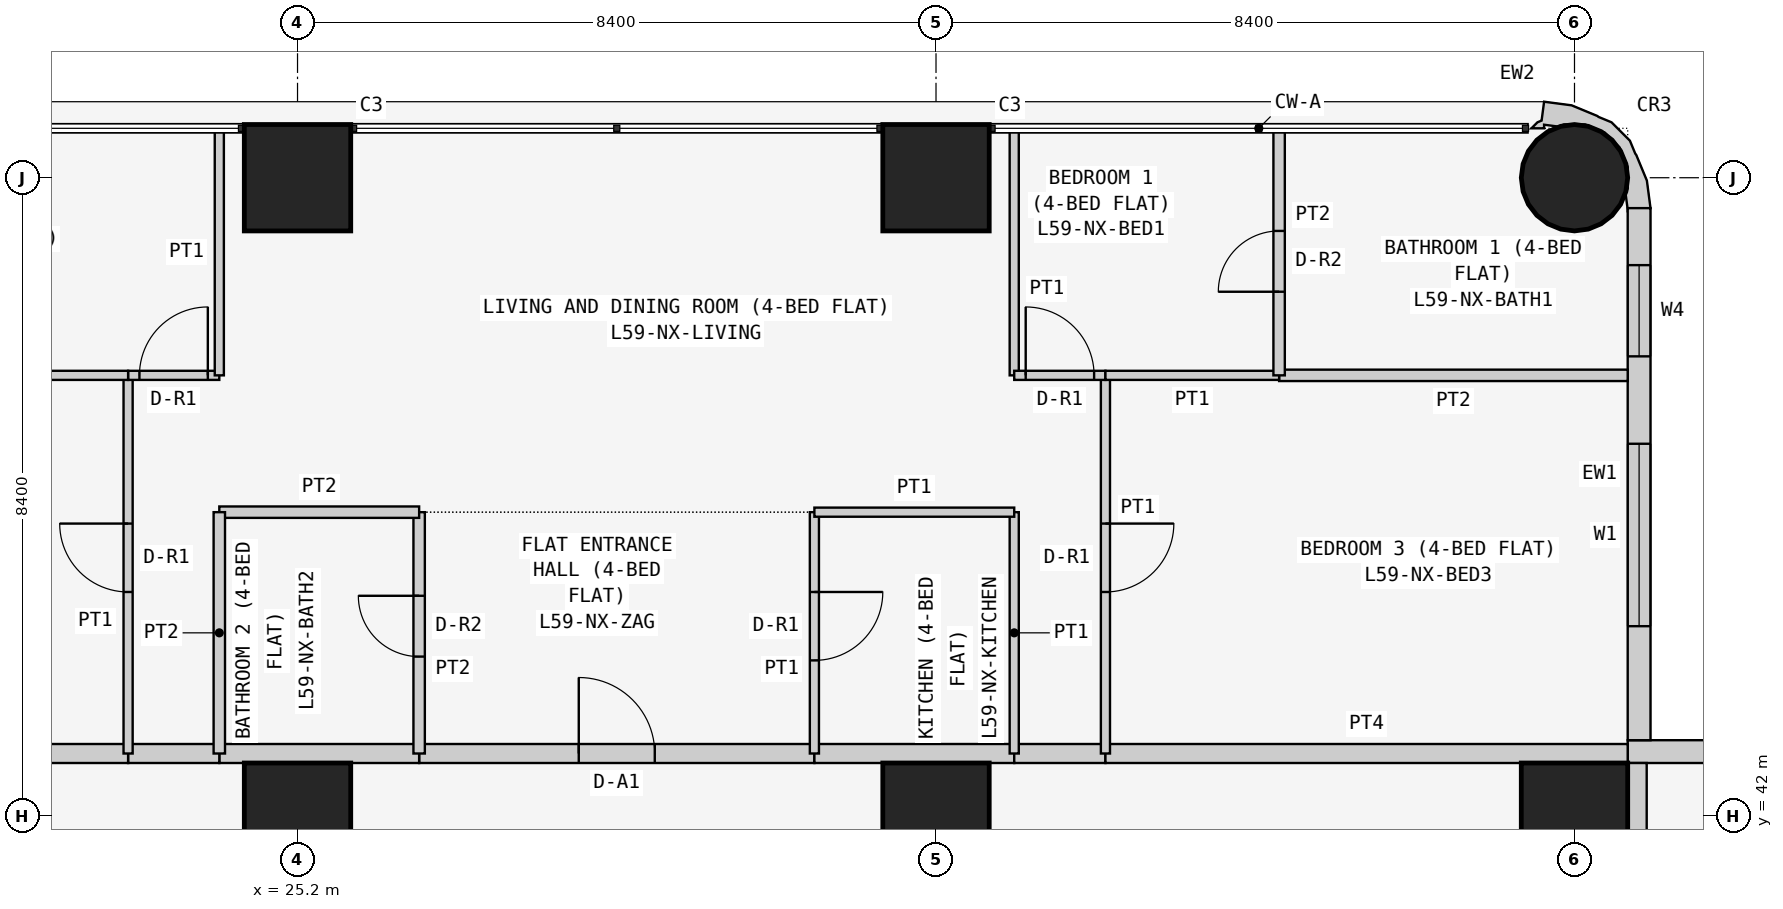
"""IFC4 building model, lengths in metres.
Left out: names, types, materials, properties, quantities, classifications, styles, units other than length and angle.
Written with IfcOpenShell. Run it as: python <this file> out.ifc"""

import sys

from ifc_helpers import new_model, si_unit, direction, frame, frame_2d, origin, origin_2d, place, context, subcontext, project, spatial, polyline, rectangle, circle, outline, extrude, element, fill, save


model = new_model("IFC4")
c1 = context("Model", 3, precision=1e-05, world=origin(), true_north=direction((0.0, 1.0)))
c2 = subcontext(c1, "Body", "Model", "MODEL_VIEW")
j1 = project(units=[si_unit("LENGTHUNIT", "METRE"), si_unit("PLANEANGLEUNIT", "RADIAN")], contexts=[c1])
p1 = place(None, origin())
s1 = spatial("IfcSite", under=j1, at=p1, CompositionType="ELEMENT")
p2 = place(p1, origin())
s2 = spatial("IfcBuilding", under=s1, at=p2, CompositionType="ELEMENT")
p3 = place(p2, frame((0.0, 0.0, 226.5)))
s3 = spatial("IfcBuildingStorey", under=s2, at=p3, CompositionType="ELEMENT", Elevation=226.5)
for number, where, z_axis, x_axis in (
    (1, (25.2, 42.0, 0.0), (0.0, 0.0, 1.0), (1.0, 0.0, 0.0)),
    (2, (25.2, 50.4, 0.0), (0.0, 0.0, 1.0), (1.0, 0.0, 0.0)),
    (3, (33.6, 42.0, 0.0), (0.0, 0.0, 1.0), (1.0, 0.0, 0.0)),
    (4, (33.6, 50.4, 0.0), (0.0, 0.0, 1.0), (1.0, 0.0, 0.0)),
    (5, (42.0, 42.0, 0.0), (0.0, 0.0, 1.0), (1.0, 0.0, 0.0)),
):
    element("IfcColumn", number, at=place(p3, frame(where, z_axis=z_axis, x_axis=x_axis)), inside=s3, PredefinedType="COLUMN", context=c2, shape_type="SweptSolid", body=[
        extrude(rectangle(XDim=1.4, YDim=1.4, at=origin_2d()), origin(), (0.0, 0.0, 1.0), 3.6),
    ])
p4 = place(p3, frame((42.0, 50.4, 0.0), z_axis=(0.0, 0.0, 1.0), x_axis=(1.0, 0.0, 0.0)))
e6 = element("IfcColumn", 6, at=p4, inside=s3, PredefinedType="COLUMN", context=c2, shape_type="SweptSolid", body=[
    extrude(circle(Radius=0.7, at=origin_2d()), origin(), (0.0, 0.0, 1.0), 3.6),
])
p5 = place(p3, frame((50.0, 42.85, 0.0), z_axis=(0.0, 0.0, 1.0), x_axis=(-1.0, 0.0, 0.0)))
e7 = element("IfcWall", 7, at=p5, inside=s3, PredefinedType="SOLIDWALL", context=c2, shape_type="SweptSolid", body=[
    extrude(rectangle(XDim=7.3, YDim=0.3, at=frame_2d((3.65, 0.0))), origin(), (0.0, 0.0, 1.0), 3.45),
])
p6 = place(p5, frame((3.1, 0.0, 0.9)))
e8 = element("IfcOpeningElement", 8, at=p6, cuts=e7, PredefinedType="OPENING", context=c2, shape_type="SweptSolid", body=[
    extrude(rectangle(XDim=2.4, YDim=1.5, at=frame_2d((1.2, 0.75))), frame((0.0, 0.16, 0.0), z_axis=(0.0, -1.0, 0.0), x_axis=(1.0, 0.0, 0.0)), (0.0, 0.0, 1.0), 0.32),
])
p7 = place(p5, frame((0.75, 0.0, 0.9)))
e9 = element("IfcOpeningElement", 9, at=p7, cuts=e7, PredefinedType="OPENING", context=c2, shape_type="SweptSolid", body=[
    extrude(rectangle(XDim=1.2, YDim=1.5, at=frame_2d((0.6, 0.75))), frame((0.0, 0.16, 0.0), z_axis=(0.0, -1.0, 0.0), x_axis=(1.0, 0.0, 0.0)), (0.0, 0.0, 1.0), 0.32),
])
p8 = place(p3, frame((42.85, 43.0, 0.0), z_axis=(0.0, 0.0, 1.0), x_axis=(0.0, 1.0, 0.0)))
e10 = element("IfcWall", 10, at=p8, inside=s3, PredefinedType="SOLIDWALL", context=c2, shape_type="SweptSolid", body=[
    extrude(rectangle(XDim=7.0, YDim=0.3, at=frame_2d((3.5, 0.0))), origin(), (0.0, 0.0, 1.0), 3.45),
])
p9 = place(p8, frame((1.5, 0.0, 0.9)))
e11 = element("IfcOpeningElement", 11, at=p9, cuts=e10, PredefinedType="OPENING", context=c2, shape_type="SweptSolid", body=[
    extrude(rectangle(XDim=2.4, YDim=1.5, at=frame_2d((1.2, 0.75))), frame((0.0, 0.16, 0.0), z_axis=(0.0, -1.0, 0.0), x_axis=(1.0, 0.0, 0.0)), (0.0, 0.0, 1.0), 0.32),
])
p10 = place(p8, frame((5.05, 0.0, 0.9)))
e12 = element("IfcOpeningElement", 12, at=p10, cuts=e10, PredefinedType="OPENING", context=c2, shape_type="SweptSolid", body=[
    extrude(rectangle(XDim=1.2, YDim=1.5, at=frame_2d((0.6, 0.75))), frame((0.0, 0.16, 0.0), z_axis=(0.0, -1.0, 0.0), x_axis=(1.0, 0.0, 0.0)), (0.0, 0.0, 1.0), 0.32),
])
p11 = place(p3, frame((42.724, 50.11, 0.0), z_axis=(0.0, 0.0, 1.0), x_axis=(0.439933741929, 0.898030234854, 0.0)))
e13 = element("IfcWall", 13, at=p11, inside=s3, PredefinedType="SOLIDWALL", context=c2, shape_type="SweptSolid", body=[
    extrude(outline(polyline([(-0.145, -0.044), (0.022, -0.296), (0.327, -0.094), (0.568, 0.18), (0.577, 0.199), (0.7, 0.337), (0.811, 0.661), (0.799, 0.845), (0.803, 0.866), (0.78, 1.231), (0.664, 1.577), (0.426, 1.497), (0.382, 1.536), (0.276, 1.572), (0.349, 1.423), (0.392, 1.444), (0.453, 1.261), (0.51, 1.211), (0.632, 0.961), (0.65, 0.683), (0.56, 0.419), (0.375, 0.21), (0.125, 0.087), (0.05, 0.082), (-0.127, -0.035), (-0.145, -0.044)])), origin(), (0.0, 0.0, 1.0), 3.45),
])
p12 = place(p3, frame((26.8, 42.825, 0.0), z_axis=(0.0, 0.0, 1.0), x_axis=(1.0, 0.0, 0.0)))
e14 = element("IfcWall", 14, at=p12, inside=s3, PredefinedType="PARTITIONING", context=c2, shape_type="SweptSolid", body=[
    extrude(rectangle(XDim=5.2, YDim=0.25, at=frame_2d((2.6, 0.0))), origin(), (0.0, 0.0, 1.0), 3.45),
])
p13 = place(p12, frame((2.1, 0.0, 0.0)))
e15 = element("IfcOpeningElement", 15, at=p13, cuts=e14, PredefinedType="OPENING", context=c2, shape_type="SweptSolid", body=[
    extrude(rectangle(XDim=1.0, YDim=2.1, at=frame_2d((0.5, 1.05))), frame((0.0, 0.135, 0.0), z_axis=(0.0, -1.0, 0.0), x_axis=(1.0, 0.0, 0.0)), (0.0, 0.0, 1.0), 0.27),
])
p14 = place(p3, frame((24.171, 42.825, 0.0), z_axis=(0.0, 0.0, 1.0), x_axis=(1.0, 0.0, 0.0)))
e16 = element("IfcWall", 16, at=p14, inside=s3, PredefinedType="PARTITIONING", context=c2, shape_type="SweptSolid", body=[
    extrude(rectangle(XDim=2.629, YDim=0.25, at=frame_2d((1.314, 0.0))), origin(), (0.0, 0.0, 1.0), 3.45),
])
p15 = place(p3, frame((32.0, 42.825, 0.0), z_axis=(0.0, 0.0, 1.0), x_axis=(1.0, 0.0, 0.0)))
e17 = element("IfcWall", 17, at=p15, inside=s3, PredefinedType="PARTITIONING", context=c2, shape_type="SweptSolid", body=[
    extrude(rectangle(XDim=2.629, YDim=0.25, at=frame_2d((1.314, 0.0))), origin(), (0.0, 0.0, 1.0), 3.45),
])
p16 = place(p3, frame((22.971, 42.825, 0.0), z_axis=(0.0, 0.0, 1.0), x_axis=(1.0, 0.0, 0.0)))
e18 = element("IfcWall", 18, at=p16, inside=s3, PredefinedType="PARTITIONING", context=c2, shape_type="SweptSolid", body=[
    extrude(rectangle(XDim=1.2, YDim=0.25, at=frame_2d((0.6, 0.0))), origin(), (0.0, 0.0, 1.0), 3.45),
])
p17 = place(p3, frame((34.629, 42.825, 0.0), z_axis=(0.0, 0.0, 1.0), x_axis=(1.0, 0.0, 0.0)))
e19 = element("IfcWall", 19, at=p17, inside=s3, PredefinedType="PARTITIONING", context=c2, shape_type="SweptSolid", body=[
    extrude(rectangle(XDim=1.2, YDim=0.25, at=frame_2d((0.6, 0.0))), origin(), (0.0, 0.0, 1.0), 3.45),
])
for number, where, z_axis, x_axis in (
    (20, (16.1, 42.825, 0.0), (0.0, 0.0, 1.0), (1.0, 0.0, 0.0)),
    (21, (35.829, 42.825, 0.0), (0.0, 0.0, 1.0), (1.0, 0.0, 0.0)),
):
    element("IfcWall", number, at=place(p3, frame(where, z_axis=z_axis, x_axis=x_axis)), inside=s3, PredefinedType="PARTITIONING", context=c2, shape_type="SweptSolid", body=[
        extrude(rectangle(XDim=6.871, YDim=0.25, at=frame_2d((3.436, 0.0))), origin(), (0.0, 0.0, 1.0), 3.45),
    ])
p18 = place(p3, frame((42.825, 42.7, 0.0), z_axis=(0.0, 0.0, 1.0), x_axis=(0.0, -1.0, 0.0)))
e22 = element("IfcWall", 22, at=p18, inside=s3, PredefinedType="PARTITIONING", context=c2, shape_type="SweptSolid", body=[
    extrude(rectangle(XDim=6.471, YDim=0.25, at=frame_2d((3.235, 0.0))), origin(), (0.0, 0.0, 1.0), 3.45),
])
p19 = place(p3, frame((26.8, 46.0, 0.0), z_axis=(0.0, 0.0, 1.0), x_axis=(0.0, -1.0, 0.0)))
e23 = element("IfcWall", 23, at=p19, inside=s3, PredefinedType="PARTITIONING", context=c2, shape_type="SweptSolid", body=[
    extrude(rectangle(XDim=3.175, YDim=0.15, at=frame_2d((1.587, 0.0))), origin(), (0.0, 0.0, 1.0), 3.45),
])
p20 = place(p19, frame((1.1, 0.0, 0.0)))
e24 = element("IfcOpeningElement", 24, at=p20, cuts=e23, PredefinedType="OPENING", context=c2, shape_type="SweptSolid", body=[
    extrude(rectangle(XDim=0.8, YDim=2.1, at=frame_2d((0.4, 1.05))), frame((0.0, 0.085, 0.0), z_axis=(0.0, -1.0, 0.0), x_axis=(1.0, 0.0, 0.0)), (0.0, 0.0, 1.0), 0.17),
])
p21 = place(p3, frame((32.0, 42.825, 0.0), z_axis=(0.0, 0.0, 1.0), x_axis=(0.0, 1.0, 0.0)))
e25 = element("IfcWall", 25, at=p21, inside=s3, PredefinedType="PARTITIONING", context=c2, shape_type="SweptSolid", body=[
    extrude(rectangle(XDim=3.175, YDim=0.12, at=frame_2d((1.587, 0.0))), origin(), (0.0, 0.0, 1.0), 3.45),
])
p22 = place(p21, frame((1.225, 0.0, 0.0)))
e26 = element("IfcOpeningElement", 26, at=p22, cuts=e25, PredefinedType="OPENING", context=c2, shape_type="SweptSolid", body=[
    extrude(rectangle(XDim=0.9, YDim=2.1, at=frame_2d((0.45, 1.05))), frame((0.0, 0.07, 0.0), z_axis=(0.0, -1.0, 0.0), x_axis=(1.0, 0.0, 0.0)), (0.0, 0.0, 1.0), 0.14),
])
p23 = place(p3, frame((26.8, 46.0, 0.0), z_axis=(0.0, 0.0, 1.0), x_axis=(-1.0, 0.0, 0.0)))
e27 = element("IfcWall", 27, at=p23, inside=s3, PredefinedType="PARTITIONING", context=c2, shape_type="SweptSolid", body=[
    extrude(rectangle(XDim=2.629, YDim=0.15, at=frame_2d((1.314, 0.0))), origin(), (0.0, 0.0, 1.0), 3.45),
])
p24 = place(p3, frame((24.171, 46.0, 0.0), z_axis=(0.0, 0.0, 1.0), x_axis=(0.0, -1.0, 0.0)))
e28 = element("IfcWall", 28, at=p24, inside=s3, PredefinedType="PARTITIONING", context=c2, shape_type="SweptSolid", body=[
    extrude(rectangle(XDim=3.175, YDim=0.15, at=frame_2d((1.587, 0.0))), origin(), (0.0, 0.0, 1.0), 3.45),
])
p25 = place(p3, frame((34.629, 42.825, 0.0), z_axis=(0.0, 0.0, 1.0), x_axis=(0.0, 1.0, 0.0)))
e29 = element("IfcWall", 29, at=p25, inside=s3, PredefinedType="PARTITIONING", context=c2, shape_type="SweptSolid", body=[
    extrude(rectangle(XDim=3.175, YDim=0.12, at=frame_2d((1.587, 0.0))), origin(), (0.0, 0.0, 1.0), 3.45),
])
p26 = place(p3, frame((34.629, 46.0, 0.0), z_axis=(0.0, 0.0, 1.0), x_axis=(-1.0, 0.0, 0.0)))
e30 = element("IfcWall", 30, at=p26, inside=s3, PredefinedType="PARTITIONING", context=c2, shape_type="SweptSolid", body=[
    extrude(rectangle(XDim=2.629, YDim=0.12, at=frame_2d((1.314, 0.0))), origin(), (0.0, 0.0, 1.0), 3.45),
])
p27 = place(p3, frame((22.971, 42.825, 0.0), z_axis=(0.0, 0.0, 1.0), x_axis=(0.0, 1.0, 0.0)))
e31 = element("IfcWall", 31, at=p27, inside=s3, PredefinedType="PARTITIONING", context=c2, shape_type="SweptSolid", body=[
    extrude(rectangle(XDim=4.975, YDim=0.12, at=frame_2d((2.488, 0.0))), origin(), (0.0, 0.0, 1.0), 3.45),
])
p28 = place(p27, frame((2.125, 0.0, 0.0)))
e32 = element("IfcOpeningElement", 32, at=p28, cuts=e31, PredefinedType="OPENING", context=c2, shape_type="SweptSolid", body=[
    extrude(rectangle(XDim=0.9, YDim=2.1, at=frame_2d((0.45, 1.05))), frame((0.0, 0.07, 0.0), z_axis=(0.0, -1.0, 0.0), x_axis=(1.0, 0.0, 0.0)), (0.0, 0.0, 1.0), 0.14),
])
p29 = place(p3, frame((22.971, 47.8, 0.0), z_axis=(0.0, 0.0, 1.0), x_axis=(1.0, 0.0, 0.0)))
e33 = element("IfcWall", 33, at=p29, inside=s3, PredefinedType="PARTITIONING", context=c2, shape_type="SweptSolid", body=[
    extrude(rectangle(XDim=1.2, YDim=0.12, at=frame_2d((0.6, 0.0))), origin(), (0.0, 0.0, 1.0), 3.45),
])
p30 = place(p29, frame((0.149, 0.0, 0.0)))
e34 = element("IfcOpeningElement", 34, at=p30, cuts=e33, PredefinedType="OPENING", context=c2, shape_type="SweptSolid", body=[
    extrude(rectangle(XDim=0.9, YDim=2.1, at=frame_2d((0.45, 1.05))), frame((0.0, 0.07, 0.0), z_axis=(0.0, -1.0, 0.0), x_axis=(1.0, 0.0, 0.0)), (0.0, 0.0, 1.0), 0.14),
])
p31 = place(p3, frame((24.171, 47.8, 0.0), z_axis=(0.0, 0.0, 1.0), x_axis=(0.0, 1.0, 0.0)))
e35 = element("IfcWall", 35, at=p31, inside=s3, PredefinedType="PARTITIONING", context=c2, shape_type="SweptSolid", body=[
    extrude(rectangle(XDim=3.25, YDim=0.12, at=frame_2d((1.625, 0.0))), origin(), (0.0, 0.0, 1.0), 3.45),
])
p32 = place(p3, frame((35.829, 47.8, 0.0), z_axis=(0.0, 0.0, 1.0), x_axis=(0.0, -1.0, 0.0)))
e36 = element("IfcWall", 36, at=p32, inside=s3, PredefinedType="PARTITIONING", context=c2, shape_type="SweptSolid", body=[
    extrude(rectangle(XDim=4.975, YDim=0.12, at=frame_2d((2.488, 0.0))), origin(), (0.0, 0.0, 1.0), 3.45),
])
p33 = place(p32, frame((1.95, 0.0, 0.0)))
e37 = element("IfcOpeningElement", 37, at=p33, cuts=e36, PredefinedType="OPENING", context=c2, shape_type="SweptSolid", body=[
    extrude(rectangle(XDim=0.9, YDim=2.1, at=frame_2d((0.45, 1.05))), frame((0.0, 0.07, 0.0), z_axis=(0.0, -1.0, 0.0), x_axis=(1.0, 0.0, 0.0)), (0.0, 0.0, 1.0), 0.14),
])
p34 = place(p3, frame((34.629, 51.05, 0.0), z_axis=(0.0, 0.0, 1.0), x_axis=(0.0, -1.0, 0.0)))
e38 = element("IfcWall", 38, at=p34, inside=s3, PredefinedType="PARTITIONING", context=c2, shape_type="SweptSolid", body=[
    extrude(rectangle(XDim=3.25, YDim=0.12, at=frame_2d((1.625, 0.0))), origin(), (0.0, 0.0, 1.0), 3.45),
])
p35 = place(p3, frame((34.629, 47.8, 0.0), z_axis=(0.0, 0.0, 1.0), x_axis=(1.0, 0.0, 0.0)))
e39 = element("IfcWall", 39, at=p35, inside=s3, PredefinedType="PARTITIONING", context=c2, shape_type="SweptSolid", body=[
    extrude(rectangle(XDim=1.2, YDim=0.12, at=frame_2d((0.6, 0.0))), origin(), (0.0, 0.0, 1.0), 3.45),
])
p36 = place(p35, frame((0.151, 0.0, 0.0)))
e40 = element("IfcOpeningElement", 40, at=p36, cuts=e39, PredefinedType="OPENING", context=c2, shape_type="SweptSolid", body=[
    extrude(rectangle(XDim=0.9, YDim=2.1, at=frame_2d((0.45, 1.05))), frame((0.0, 0.07, 0.0), z_axis=(0.0, -1.0, 0.0), x_axis=(1.0, 0.0, 0.0)), (0.0, 0.0, 1.0), 0.14),
])
p37 = place(p3, frame((22.971, 47.8, 0.0), z_axis=(0.0, 0.0, 1.0), x_axis=(-1.0, 0.0, 0.0)))
e41 = element("IfcWall", 41, at=p37, inside=s3, PredefinedType="PARTITIONING", context=c2, shape_type="SweptSolid", body=[
    extrude(rectangle(XDim=6.871, YDim=0.12, at=frame_2d((3.436, 0.0))), origin(), (0.0, 0.0, 1.0), 3.45),
])
p38 = place(p3, frame((42.7, 47.8, 0.0), z_axis=(0.0, 0.0, 1.0), x_axis=(-1.0, 0.0, 0.0)))
e42 = element("IfcWall", 42, at=p38, inside=s3, PredefinedType="PARTITIONING", context=c2, shape_type="SweptSolid", body=[
    extrude(rectangle(XDim=4.586, YDim=0.15, at=frame_2d((2.293, 0.0))), origin(), (0.0, 0.0, 1.0), 3.45),
])
p39 = place(p3, frame((38.114, 47.8, 0.0), z_axis=(0.0, 0.0, 1.0), x_axis=(-1.0, 0.0, 0.0)))
e43 = element("IfcWall", 43, at=p39, inside=s3, PredefinedType="PARTITIONING", context=c2, shape_type="SweptSolid", body=[
    extrude(rectangle(XDim=2.285, YDim=0.12, at=frame_2d((1.143, 0.0))), origin(), (0.0, 0.0, 1.0), 3.45),
])
p40 = place(p3, frame((38.114, 51.05, 0.0), z_axis=(0.0, 0.0, 1.0), x_axis=(0.0, -1.0, 0.0)))
e44 = element("IfcWall", 44, at=p40, inside=s3, PredefinedType="PARTITIONING", context=c2, shape_type="SweptSolid", body=[
    extrude(rectangle(XDim=3.25, YDim=0.15, at=frame_2d((1.625, 0.0))), origin(), (0.0, 0.0, 1.0), 3.45),
])
p41 = place(p40, frame((1.35, 0.0, 0.0)))
e45 = element("IfcOpeningElement", 45, at=p41, cuts=e44, PredefinedType="OPENING", context=c2, shape_type="SweptSolid", body=[
    extrude(rectangle(XDim=0.8, YDim=2.1, at=frame_2d((0.4, 1.05))), frame((0.0, 0.085, 0.0), z_axis=(0.0, -1.0, 0.0), x_axis=(1.0, 0.0, 0.0)), (0.0, 0.0, 1.0), 0.17),
])
p42 = place(p9, origin())
e46 = element("IfcWindow", 46, at=p42, inside=s3, PartitioningType="SINGLE_PANEL", PredefinedType="WINDOW", context=c2, shape_type="SweptSolid", body=[
    extrude(rectangle(XDim=2.4, YDim=1.5, at=frame_2d((1.2, 0.75))), frame((0.0, 0.03, 0.0), z_axis=(0.0, -1.0, 0.0), x_axis=(1.0, 0.0, 0.0)), (0.0, 0.0, 1.0), 0.06),
])
fill(e11, e46)
p43 = place(p10, origin())
e47 = element("IfcWindow", 47, at=p43, inside=s3, PartitioningType="SINGLE_PANEL", PredefinedType="WINDOW", context=c2, shape_type="SweptSolid", body=[
    extrude(rectangle(XDim=1.2, YDim=1.5, at=frame_2d((0.6, 0.75))), frame((0.0, 0.03, 0.0), z_axis=(0.0, -1.0, 0.0), x_axis=(1.0, 0.0, 0.0)), (0.0, 0.0, 1.0), 0.06),
])
fill(e12, e47)
p44 = place(p13, origin())
e48 = element("IfcDoor", 48, at=p44, inside=s3, OperationType="SINGLE_SWING_LEFT", PredefinedType="DOOR", context=c2, shape_type="SweptSolid", body=[
    extrude(rectangle(XDim=1.0, YDim=2.1, at=frame_2d((0.5, 1.05))), frame((0.0, 0.025, 0.0), z_axis=(0.0, -1.0, 0.0), x_axis=(1.0, 0.0, 0.0)), (0.0, 0.0, 1.0), 0.05),
])
fill(e15, e48)
p45 = place(p20, frame((0.8, 0.0, 0.0), z_axis=(0.0, 0.0, 1.0), x_axis=(-1.0, 0.0, 0.0)))
e49 = element("IfcDoor", 49, at=p45, inside=s3, OperationType="SINGLE_SWING_RIGHT", PredefinedType="DOOR", context=c2, shape_type="SweptSolid", body=[
    extrude(rectangle(XDim=0.8, YDim=2.1, at=frame_2d((0.4, 1.05))), frame((0.0, 0.025, 0.0), z_axis=(0.0, -1.0, 0.0), x_axis=(1.0, 0.0, 0.0)), (0.0, 0.0, 1.0), 0.05),
])
fill(e24, e49)
p46 = place(p22, frame((0.9, 0.0, 0.0), z_axis=(0.0, 0.0, 1.0), x_axis=(-1.0, 0.0, 0.0)))
e50 = element("IfcDoor", 50, at=p46, inside=s3, OperationType="SINGLE_SWING_LEFT", PredefinedType="DOOR", context=c2, shape_type="SweptSolid", body=[
    extrude(rectangle(XDim=0.9, YDim=2.1, at=frame_2d((0.45, 1.05))), frame((0.0, 0.025, 0.0), z_axis=(0.0, -1.0, 0.0), x_axis=(1.0, 0.0, 0.0)), (0.0, 0.0, 1.0), 0.05),
])
fill(e26, e50)
p47 = place(p28, origin())
e51 = element("IfcDoor", 51, at=p47, inside=s3, OperationType="SINGLE_SWING_RIGHT", PredefinedType="DOOR", context=c2, shape_type="SweptSolid", body=[
    extrude(rectangle(XDim=0.9, YDim=2.1, at=frame_2d((0.45, 1.05))), frame((0.0, 0.025, 0.0), z_axis=(0.0, -1.0, 0.0), x_axis=(1.0, 0.0, 0.0)), (0.0, 0.0, 1.0), 0.05),
])
fill(e32, e51)
p48 = place(p30, origin())
e52 = element("IfcDoor", 52, at=p48, inside=s3, OperationType="SINGLE_SWING_RIGHT", PredefinedType="DOOR", context=c2, shape_type="SweptSolid", body=[
    extrude(rectangle(XDim=0.9, YDim=2.1, at=frame_2d((0.45, 1.05))), frame((0.0, 0.025, 0.0), z_axis=(0.0, -1.0, 0.0), x_axis=(1.0, 0.0, 0.0)), (0.0, 0.0, 1.0), 0.05),
])
fill(e34, e52)
p49 = place(p33, origin())
e53 = element("IfcDoor", 53, at=p49, inside=s3, OperationType="SINGLE_SWING_LEFT", PredefinedType="DOOR", context=c2, shape_type="SweptSolid", body=[
    extrude(rectangle(XDim=0.9, YDim=2.1, at=frame_2d((0.45, 1.05))), frame((0.0, 0.025, 0.0), z_axis=(0.0, -1.0, 0.0), x_axis=(1.0, 0.0, 0.0)), (0.0, 0.0, 1.0), 0.05),
])
fill(e37, e53)
p50 = place(p36, origin())
e54 = element("IfcDoor", 54, at=p50, inside=s3, OperationType="SINGLE_SWING_LEFT", PredefinedType="DOOR", context=c2, shape_type="SweptSolid", body=[
    extrude(rectangle(XDim=0.9, YDim=2.1, at=frame_2d((0.45, 1.05))), frame((0.0, 0.025, 0.0), z_axis=(0.0, -1.0, 0.0), x_axis=(1.0, 0.0, 0.0)), (0.0, 0.0, 1.0), 0.05),
])
fill(e40, e54)
p51 = place(p41, frame((0.8, 0.0, 0.0), z_axis=(0.0, 0.0, 1.0), x_axis=(-1.0, 0.0, 0.0)))
e55 = element("IfcDoor", 55, at=p51, inside=s3, OperationType="SINGLE_SWING_LEFT", PredefinedType="DOOR", context=c2, shape_type="SweptSolid", body=[
    extrude(rectangle(XDim=0.8, YDim=2.1, at=frame_2d((0.4, 1.05))), frame((0.0, 0.025, 0.0), z_axis=(0.0, -1.0, 0.0), x_axis=(1.0, 0.0, 0.0)), (0.0, 0.0, 1.0), 0.05),
])
fill(e45, e55)
save(model, sys.argv[1])
